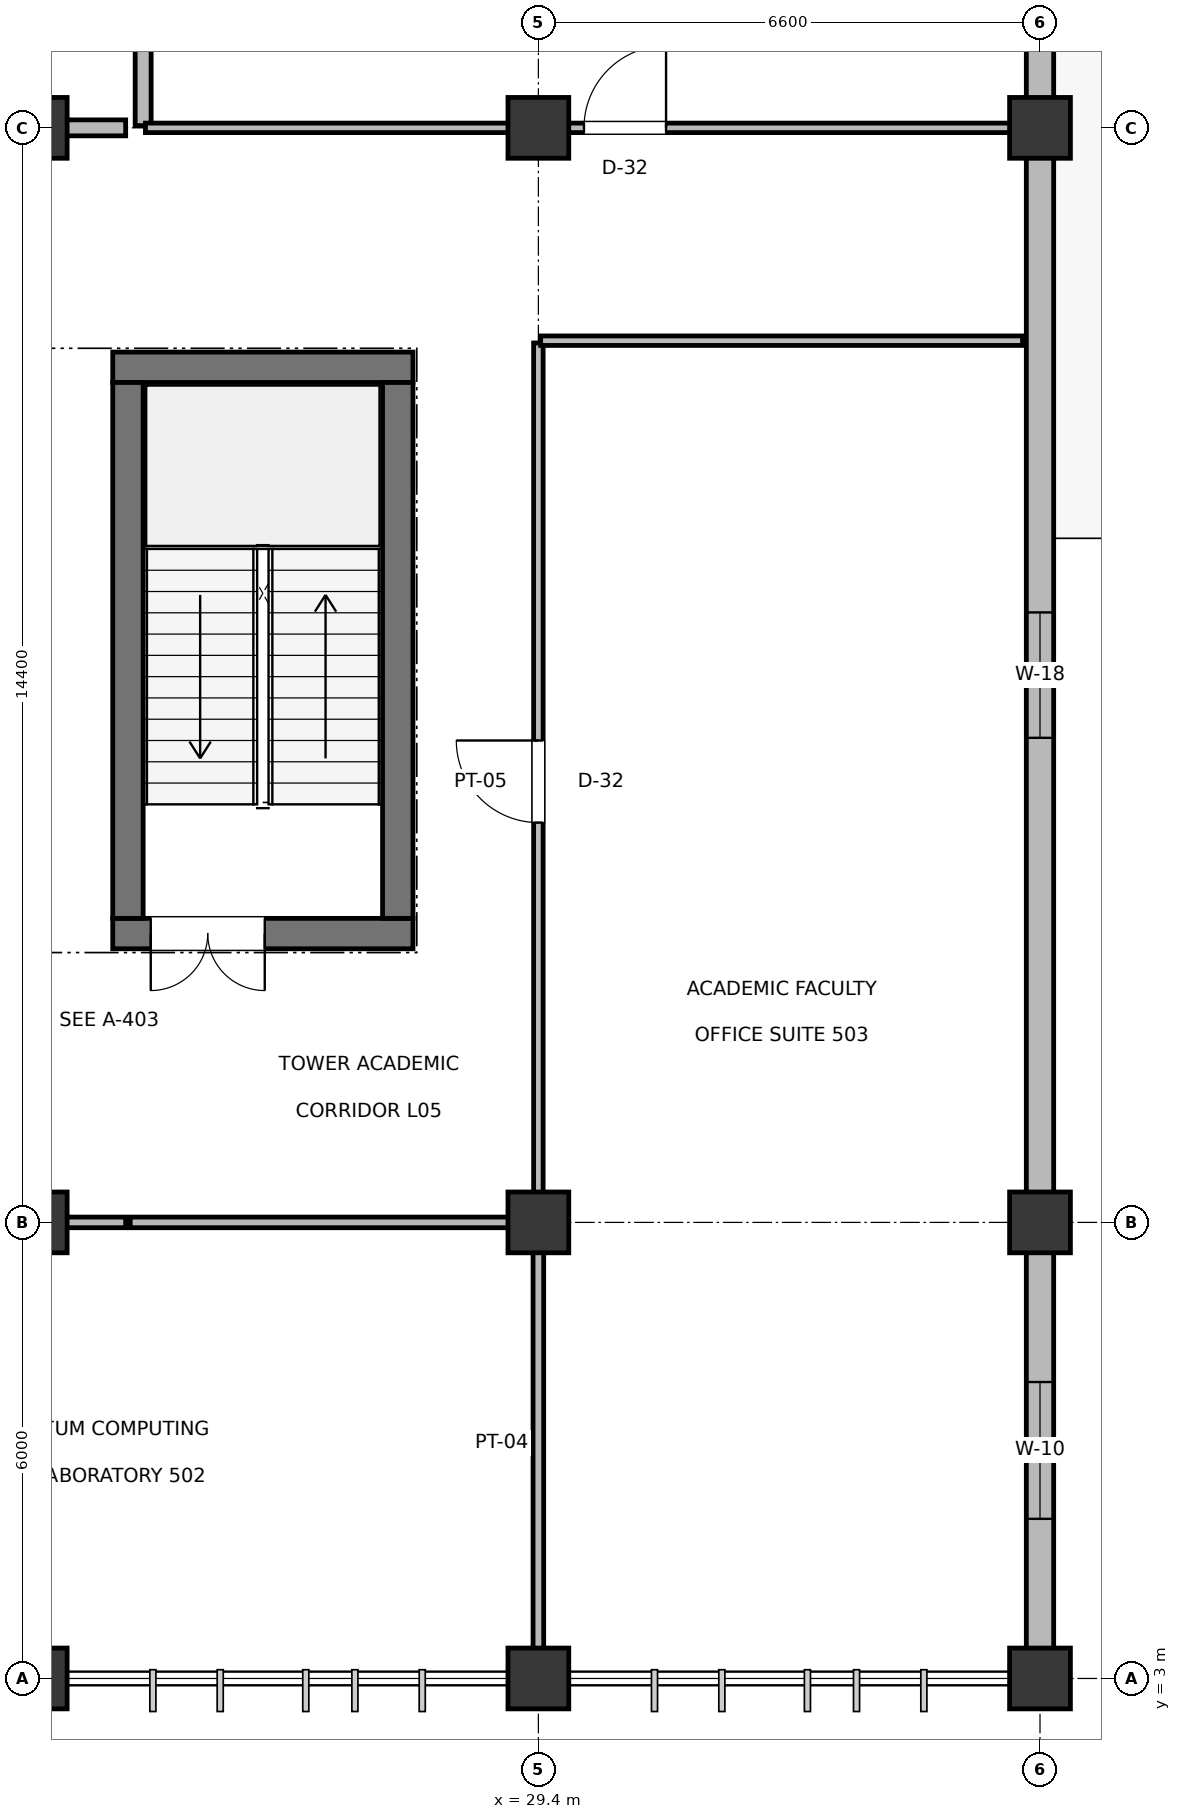
"""IFC4 building model, lengths in metres.
Left out: names, types, materials, properties, quantities, classifications, styles, units other than length and angle.
Written with IfcOpenShell. Run it as: python <this file> out.ifc"""

import sys

from ifc_helpers import new_model, si_unit, direction, frame, frame_2d, origin, origin_2d, place, context, subcontext, project, spatial, rectangle, extrude, element, fill, save


model = new_model("IFC4")
c1 = context("Model", 3, precision=1e-05, world=origin(), true_north=direction((0.0, 1.0)))
c2 = subcontext(c1, "Body", "Model", "MODEL_VIEW")
j1 = project(units=[si_unit("LENGTHUNIT", "METRE"), si_unit("PLANEANGLEUNIT", "RADIAN")], contexts=[c1])
p1 = place(None, origin())
s1 = spatial("IfcSite", under=j1, at=p1, CompositionType="ELEMENT")
p2 = place(p1, origin())
s2 = spatial("IfcBuilding", under=s1, at=p2, CompositionType="ELEMENT")
p3 = place(p2, frame((0.0, 0.0, 24.0)))
s3 = spatial("IfcBuildingStorey", under=s2, at=p3, CompositionType="ELEMENT", Elevation=24.0)
for number, where, z_axis, x_axis in (
    (1, (22.8, 3.0, 0.0), (0.0, 0.0, 1.0), (1.0, 0.0, 0.0)),
    (2, (22.8, 9.0, 0.0), (0.0, 0.0, 1.0), (1.0, 0.0, 0.0)),
    (3, (22.8, 23.4, 0.0), (0.0, 0.0, 1.0), (1.0, 0.0, 0.0)),
    (4, (29.4, 3.0, 0.0), (0.0, 0.0, 1.0), (1.0, 0.0, 0.0)),
    (5, (29.4, 9.0, 0.0), (0.0, 0.0, 1.0), (1.0, 0.0, 0.0)),
    (6, (29.4, 23.4, 0.0), (0.0, 0.0, 1.0), (1.0, 0.0, 0.0)),
    (7, (36.0, 3.0, 0.0), (0.0, 0.0, 1.0), (1.0, 0.0, 0.0)),
    (8, (36.0, 9.0, 0.0), (0.0, 0.0, 1.0), (1.0, 0.0, 0.0)),
    (9, (36.0, 23.4, 0.0), (0.0, 0.0, 1.0), (1.0, 0.0, 0.0)),
):
    element("IfcColumn", number, at=place(p3, frame(where, z_axis=z_axis, x_axis=x_axis)), inside=s3, PredefinedType="COLUMN", context=c2, shape_type="SweptSolid", body=[
        extrude(rectangle(XDim=0.8, YDim=0.8, at=origin_2d()), origin(), (0.0, 0.0, 1.0), 4.5),
    ])
p4 = place(p3, frame((36.0, 3.385, 0.0), z_axis=(0.0, 0.0, 1.0), x_axis=(0.0, 1.0, 0.0)))
e10 = element("IfcWall", 10, at=p4, inside=s3, PredefinedType="SOLIDWALL", context=c2, shape_type="SweptSolid", body=[
    extrude(rectangle(XDim=5.23, YDim=0.36, at=frame_2d((2.615, 0.0))), origin(), (0.0, 0.0, 1.0), 3.575),
])
p5 = place(p4, frame((1.715, 0.0, 0.9)))
e11 = element("IfcOpeningElement", 11, at=p5, cuts=e10, PredefinedType="OPENING", context=c2, shape_type="SweptSolid", body=[
    extrude(rectangle(XDim=1.8, YDim=1.75, at=frame_2d((0.9, 0.875))), frame((0.0, 0.19, 0.0), z_axis=(0.0, -1.0, 0.0), x_axis=(1.0, 0.0, 0.0)), (0.0, 0.0, 1.0), 0.38),
])
p6 = place(p3, frame((36.0, 9.385, 0.0), z_axis=(0.0, 0.0, 1.0), x_axis=(0.0, 1.0, 0.0)))
e12 = element("IfcWall", 12, at=p6, inside=s3, PredefinedType="SOLIDWALL", context=c2, shape_type="SweptSolid", body=[
    extrude(rectangle(XDim=13.63, YDim=0.36, at=frame_2d((6.815, 0.0))), origin(), (0.0, 0.0, 1.0), 3.375),
])
p7 = place(p6, frame((5.99, 0.0, 0.9)))
e13 = element("IfcOpeningElement", 13, at=p7, cuts=e12, PredefinedType="OPENING", context=c2, shape_type="SweptSolid", body=[
    extrude(rectangle(XDim=1.65, YDim=1.65, at=frame_2d((0.825, 0.825))), frame((0.0, 0.19, 0.0), z_axis=(0.0, -1.0, 0.0), x_axis=(1.0, 0.0, 0.0)), (0.0, 0.0, 1.0), 0.38),
])
p8 = place(p3, frame((36.0, 23.785, 0.0), z_axis=(0.0, 0.0, 1.0), x_axis=(0.0, 1.0, 0.0)))
e14 = element("IfcWall", 14, at=p8, inside=s3, PredefinedType="SOLIDWALL", context=c2, shape_type="SweptSolid", body=[
    extrude(rectangle(XDim=5.83, YDim=0.36, at=frame_2d((2.915, 0.0))), origin(), (0.0, 0.0, 1.0), 3.575),
])
p9 = place(p8, frame((2.19, 0.0, 0.9)))
e15 = element("IfcOpeningElement", 15, at=p9, cuts=e14, PredefinedType="OPENING", context=c2, shape_type="SweptSolid", body=[
    extrude(rectangle(XDim=1.45, YDim=1.5, at=frame_2d((0.725, 0.75))), frame((0.0, 0.19, 0.0), z_axis=(0.0, -1.0, 0.0), x_axis=(1.0, 0.0, 0.0)), (0.0, 0.0, 1.0), 0.38),
])
p10 = place(p3, frame((23.8, 12.8, 0.0), z_axis=(0.0, 0.0, 1.0), x_axis=(1.0, 0.0, 0.0)))
e16 = element("IfcWall", 16, at=p10, inside=s3, PredefinedType="SHEAR", context=c2, shape_type="SweptSolid", body=[
    extrude(rectangle(XDim=3.95, YDim=0.4, at=frame_2d((1.975, 0.0))), origin(), (0.0, 0.0, 1.0), 4.28),
])
p11 = place(p10, frame((0.5, 0.0, 0.0)))
e17 = element("IfcOpeningElement", 17, at=p11, cuts=e16, PredefinedType="OPENING", context=c2, shape_type="SweptSolid", body=[
    extrude(rectangle(XDim=1.5, YDim=2.2, at=frame_2d((0.75, 1.1))), frame((0.0, 0.21, 0.0), z_axis=(0.0, -1.0, 0.0), x_axis=(1.0, 0.0, 0.0)), (0.0, 0.0, 1.0), 0.42),
])
p12 = place(p3, frame((23.8, 20.25, 0.0), z_axis=(0.0, 0.0, 1.0), x_axis=(1.0, 0.0, 0.0)))
e18 = element("IfcWall", 18, at=p12, inside=s3, PredefinedType="SHEAR", context=c2, shape_type="SweptSolid", body=[
    extrude(rectangle(XDim=3.95, YDim=0.4, at=frame_2d((1.975, 0.0))), origin(), (0.0, 0.0, 1.0), 4.28),
])
for number, where, z_axis, x_axis in (
    (19, (24.0, 13.0, 0.0), (0.0, 0.0, 1.0), (0.0, 1.0, 0.0)),
    (20, (27.55, 13.0, 0.0), (0.0, 0.0, 1.0), (0.0, 1.0, 0.0)),
):
    element("IfcWall", number, at=place(p3, frame(where, z_axis=z_axis, x_axis=x_axis)), inside=s3, PredefinedType="SHEAR", context=c2, shape_type="SweptSolid", body=[
        extrude(rectangle(XDim=7.05, YDim=0.4, at=frame_2d((3.525, 0.0))), origin(), (0.0, 0.0, 1.0), 4.28),
    ])
p13 = place(p3, frame((29.4, 3.23, 0.0), z_axis=(0.0, 0.0, 1.0), x_axis=(0.0, 1.0, 0.0)))
e21 = element("IfcWall", 21, at=p13, inside=s3, PredefinedType="PARTITIONING", context=c2, shape_type="SweptSolid", body=[
    extrude(rectangle(XDim=5.74, YDim=0.14, at=frame_2d((2.87, 0.0))), origin(), (0.0, 0.0, 1.0), 3.575),
])
p14 = place(p3, frame((24.03, 9.0, 0.0), z_axis=(0.0, 0.0, 1.0), x_axis=(1.0, 0.0, 0.0)))
e22 = element("IfcWall", 22, at=p14, inside=s3, PredefinedType="PARTITIONING", context=c2, shape_type="SweptSolid", body=[
    extrude(rectangle(XDim=5.34, YDim=0.14, at=frame_2d((2.67, 0.0))), origin(), (0.0, 0.0, 1.0), 3.455),
])
p15 = place(p3, frame((17.83, 9.0, 0.0), z_axis=(0.0, 0.0, 1.0), x_axis=(1.0, 0.0, 0.0)))
e23 = element("IfcWall", 23, at=p15, inside=s3, PredefinedType="PARTITIONING", context=c2, shape_type="SweptSolid", body=[
    extrude(rectangle(XDim=6.14, YDim=0.14, at=frame_2d((3.07, 0.0))), origin(), (0.0, 0.0, 1.0), 3.455),
])
p16 = place(p15, frame((2.495, 0.0, 0.0)))
e24 = element("IfcOpeningElement", 24, at=p16, cuts=e23, PredefinedType="OPENING", context=c2, shape_type="SweptSolid", body=[
    extrude(rectangle(XDim=1.15, YDim=2.15, at=frame_2d((0.575, 1.075))), frame((0.0, 0.08, 0.0), z_axis=(0.0, -1.0, 0.0), x_axis=(1.0, 0.0, 0.0)), (0.0, 0.0, 1.0), 0.16),
])
p17 = place(p3, frame((29.4, 9.03, 0.0), z_axis=(0.0, 0.0, 1.0), x_axis=(0.0, 1.0, 0.0)))
e25 = element("IfcWall", 25, at=p17, inside=s3, PredefinedType="PARTITIONING", context=c2, shape_type="SweptSolid", body=[
    extrude(rectangle(XDim=11.54, YDim=0.125, at=frame_2d((5.77, 0.0))), origin(), (0.0, 0.0, 1.0), 3.375),
])
p18 = place(p17, frame((5.23, 0.0, 0.0)))
e26 = element("IfcOpeningElement", 26, at=p18, cuts=e25, PredefinedType="OPENING", context=c2, shape_type="SweptSolid", body=[
    extrude(rectangle(XDim=1.08, YDim=2.15, at=frame_2d((0.54, 1.075))), frame((0.0, 0.073, 0.0), z_axis=(0.0, -1.0, 0.0), x_axis=(1.0, 0.0, 0.0)), (0.0, 0.0, 1.0), 0.145),
])
p19 = place(p3, frame((29.43, 20.6, 0.0), z_axis=(0.0, 0.0, 1.0), x_axis=(1.0, 0.0, 0.0)))
e27 = element("IfcWall", 27, at=p19, inside=s3, PredefinedType="PARTITIONING", context=c2, shape_type="SweptSolid", body=[
    extrude(rectangle(XDim=6.34, YDim=0.125, at=frame_2d((3.17, 0.0))), origin(), (0.0, 0.0, 1.0), 3.375),
])
p20 = place(p3, frame((24.2, 23.43, 0.0), z_axis=(0.0, 0.0, 1.0), x_axis=(0.0, 1.0, 0.0)))
e28 = element("IfcWall", 28, at=p20, inside=s3, PredefinedType="PLUMBINGWALL", context=c2, shape_type="SweptSolid", body=[
    extrude(rectangle(XDim=6.34, YDim=0.21, at=frame_2d((3.17, 0.0))), origin(), (0.0, 0.0, 1.0), 3.525),
])
p21 = place(p3, frame((17.83, 23.4, 0.0), z_axis=(0.0, 0.0, 1.0), x_axis=(1.0, 0.0, 0.0)))
e29 = element("IfcWall", 29, at=p21, inside=s3, PredefinedType="PLUMBINGWALL", context=c2, shape_type="SweptSolid", body=[
    extrude(rectangle(XDim=6.14, YDim=0.21, at=frame_2d((3.07, 0.0))), origin(), (0.0, 0.0, 1.0), 3.395),
])
p22 = place(p3, frame((24.23, 23.4, 0.0), z_axis=(0.0, 0.0, 1.0), x_axis=(1.0, 0.0, 0.0)))
e30 = element("IfcWall", 30, at=p22, inside=s3, PredefinedType="PARTITIONING", context=c2, shape_type="SweptSolid", body=[
    extrude(rectangle(XDim=11.54, YDim=0.125, at=frame_2d((5.77, 0.0))), origin(), (0.0, 0.0, 1.0), 3.305),
])
p23 = place(p22, frame((5.77, 0.0, 0.0)))
e31 = element("IfcOpeningElement", 31, at=p23, cuts=e30, PredefinedType="OPENING", context=c2, shape_type="SweptSolid", body=[
    extrude(rectangle(XDim=1.08, YDim=2.15, at=frame_2d((0.54, 1.075))), frame((0.0, 0.073, 0.0), z_axis=(0.0, -1.0, 0.0), x_axis=(1.0, 0.0, 0.0)), (0.0, 0.0, 1.0), 0.145),
])
p24 = place(p5, frame((1.8, 0.0, 0.0), z_axis=(0.0, 0.0, 1.0), x_axis=(-1.0, 0.0, 0.0)))
e32 = element("IfcWindow", 32, at=p24, inside=s3, PartitioningType="DOUBLE_PANEL_HORIZONTAL", PredefinedType="WINDOW", context=c2, shape_type="SweptSolid", body=[
    extrude(rectangle(XDim=1.8, YDim=1.75, at=frame_2d((0.9, 0.875))), frame((0.0, 0.03, 0.0), z_axis=(0.0, -1.0, 0.0), x_axis=(1.0, 0.0, 0.0)), (0.0, 0.0, 1.0), 0.06),
])
fill(e11, e32)
p25 = place(p7, frame((1.65, 0.0, 0.0), z_axis=(0.0, 0.0, 1.0), x_axis=(-1.0, 0.0, 0.0)))
e33 = element("IfcWindow", 33, at=p25, inside=s3, PartitioningType="SINGLE_PANEL", PredefinedType="WINDOW", context=c2, shape_type="SweptSolid", body=[
    extrude(rectangle(XDim=1.65, YDim=1.65, at=frame_2d((0.825, 0.825))), frame((0.0, 0.03, 0.0), z_axis=(0.0, -1.0, 0.0), x_axis=(1.0, 0.0, 0.0)), (0.0, 0.0, 1.0), 0.06),
])
fill(e13, e33)
p26 = place(p11, frame((1.5, 0.0, 0.0), z_axis=(0.0, 0.0, 1.0), x_axis=(-1.0, 0.0, 0.0)))
e34 = element("IfcDoor", 34, at=p26, inside=s3, OperationType="DOUBLE_DOOR_SINGLE_SWING", PredefinedType="DOOR", context=c2, shape_type="SweptSolid", body=[
    extrude(rectangle(XDim=1.5, YDim=2.2, at=frame_2d((0.75, 1.1))), frame((0.0, 0.025, 0.0), z_axis=(0.0, -1.0, 0.0), x_axis=(1.0, 0.0, 0.0)), (0.0, 0.0, 1.0), 0.05),
])
fill(e17, e34)
p27 = place(p18, origin())
e35 = element("IfcDoor", 35, at=p27, inside=s3, OperationType="SINGLE_SWING_RIGHT", PredefinedType="DOOR", context=c2, shape_type="SweptSolid", body=[
    extrude(rectangle(XDim=1.08, YDim=2.15, at=frame_2d((0.54, 1.075))), frame((0.0, 0.025, 0.0), z_axis=(0.0, -1.0, 0.0), x_axis=(1.0, 0.0, 0.0)), (0.0, 0.0, 1.0), 0.05),
])
fill(e26, e35)
p28 = place(p23, origin())
e36 = element("IfcDoor", 36, at=p28, inside=s3, OperationType="SINGLE_SWING_RIGHT", PredefinedType="DOOR", context=c2, shape_type="SweptSolid", body=[
    extrude(rectangle(XDim=1.08, YDim=2.15, at=frame_2d((0.54, 1.075))), frame((0.0, 0.025, 0.0), z_axis=(0.0, -1.0, 0.0), x_axis=(1.0, 0.0, 0.0)), (0.0, 0.0, 1.0), 0.05),
])
fill(e31, e36)
save(model, sys.argv[1])
